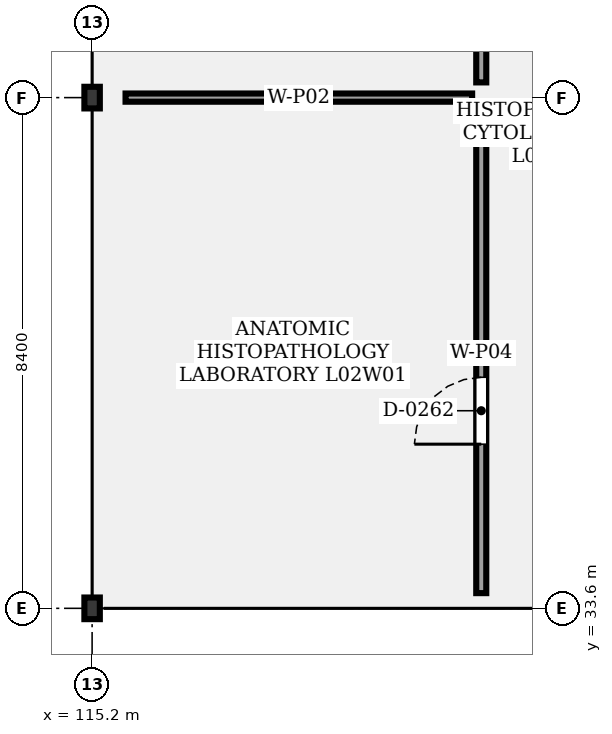
"""IFC4 building model, lengths in metres.
Left out: names, types, materials, properties, quantities, classifications, styles, units other than length and angle.
Written with IfcOpenShell. Run it as: python <this file> out.ifc"""

import sys

from ifc_helpers import new_model, si_unit, direction, frame, frame_2d, origin, origin_2d, place, context, subcontext, project, spatial, rectangle, i_section, extrude, element, fill, save


model = new_model("IFC4")
c1 = context("Model", 3, precision=1e-05, world=origin(), true_north=direction((0.0, 1.0)))
c2 = subcontext(c1, "Body", "Model", "MODEL_VIEW")
j1 = project(units=[si_unit("LENGTHUNIT", "METRE"), si_unit("PLANEANGLEUNIT", "RADIAN")], contexts=[c1])
p1 = place(None, origin())
s1 = spatial("IfcSite", under=j1, at=p1, CompositionType="ELEMENT")
p2 = place(p1, origin())
s2 = spatial("IfcBuilding", under=s1, at=p2, CompositionType="ELEMENT")
p3 = place(p2, frame((0.0, 0.0, 9.9)))
s3 = spatial("IfcBuildingStorey", under=s2, at=p3, CompositionType="ELEMENT", Elevation=9.9)
for number, where, z_axis, x_axis in (
    (1, (115.2, 33.6, 0.0), (0.0, 0.0, 1.0), (0.0, -1.0, 0.0)),
    (2, (115.2, 42.0, 0.0), (0.0, 0.0, 1.0), (0.0, -1.0, 0.0)),
):
    element("IfcColumn", number, at=place(p3, frame(where, z_axis=z_axis, x_axis=x_axis)), inside=s3, PredefinedType="COLUMN", context=c2, shape_type="SweptSolid", body=[
        extrude(i_section(OverallWidth=0.254, OverallDepth=0.356, WebThickness=0.011, FlangeThickness=0.018, at=origin_2d()), origin(), (0.0, 0.0, 1.0), 3.6),
    ])
p4 = place(p3, frame((121.6, 33.85, 0.0), z_axis=(0.0, 0.0, 1.0), x_axis=(0.0, 1.0, 0.0)))
e3 = element("IfcWall", 3, at=p4, inside=s3, PredefinedType="PARTITIONING", context=c2, shape_type="SweptSolid", body=[
    extrude(rectangle(XDim=7.9, YDim=0.165, at=frame_2d((3.95, 0.0))), origin(), (0.0, 0.0, 1.0), 2.48),
])
p5 = place(p4, frame((2.45, 0.0, 0.0)))
e4 = element("IfcOpeningElement", 4, at=p5, cuts=e3, PredefinedType="OPENING", context=c2, shape_type="SweptSolid", body=[
    extrude(rectangle(XDim=1.1, YDim=2.4, at=frame_2d((0.55, 1.2))), frame((0.0, 0.093, 0.0), z_axis=(0.0, -1.0, 0.0), x_axis=(1.0, 0.0, 0.0)), (0.0, 0.0, 1.0), 0.185),
])
p6 = place(p3, frame((121.6, 42.25, 0.0), z_axis=(0.0, 0.0, 1.0), x_axis=(0.0, 1.0, 0.0)))
e5 = element("IfcWall", 5, at=p6, inside=s3, PredefinedType="PARTITIONING", context=c2, shape_type="SweptSolid", body=[
    extrude(rectangle(XDim=7.9, YDim=0.165, at=frame_2d((3.95, 0.0))), origin(), (0.0, 0.0, 1.0), 2.48),
])
p7 = place(p6, frame((2.45, 0.0, 0.0)))
e6 = element("IfcOpeningElement", 6, at=p7, cuts=e5, PredefinedType="OPENING", context=c2, shape_type="SweptSolid", body=[
    extrude(rectangle(XDim=1.1, YDim=2.4, at=frame_2d((0.55, 1.2))), frame((0.0, 0.093, 0.0), z_axis=(0.0, -1.0, 0.0), x_axis=(1.0, 0.0, 0.0)), (0.0, 0.0, 1.0), 0.185),
])
p8 = place(p3, frame((115.75, 42.0, 0.0), z_axis=(0.0, 0.0, 1.0), x_axis=(1.0, 0.0, 0.0)))
e7 = element("IfcWall", 7, at=p8, inside=s3, PredefinedType="PARTITIONING", context=c2, shape_type="SweptSolid", body=[
    extrude(rectangle(XDim=5.7, YDim=0.135, at=frame_2d((2.85, 0.0))), origin(), (0.0, 0.0, 1.0), 2.48),
])
p9 = place(p5, origin())
e8 = element("IfcDoor", 8, at=p9, inside=s3, OperationType="SINGLE_SWING_LEFT", PredefinedType="DOOR", context=c2, shape_type="SweptSolid", body=[
    extrude(rectangle(XDim=1.1, YDim=2.4, at=frame_2d((0.55, 1.2))), frame((0.0, 0.025, 0.0), z_axis=(0.0, -1.0, 0.0), x_axis=(1.0, 0.0, 0.0)), (0.0, 0.0, 1.0), 0.05),
])
fill(e4, e8)
save(model, sys.argv[1])
